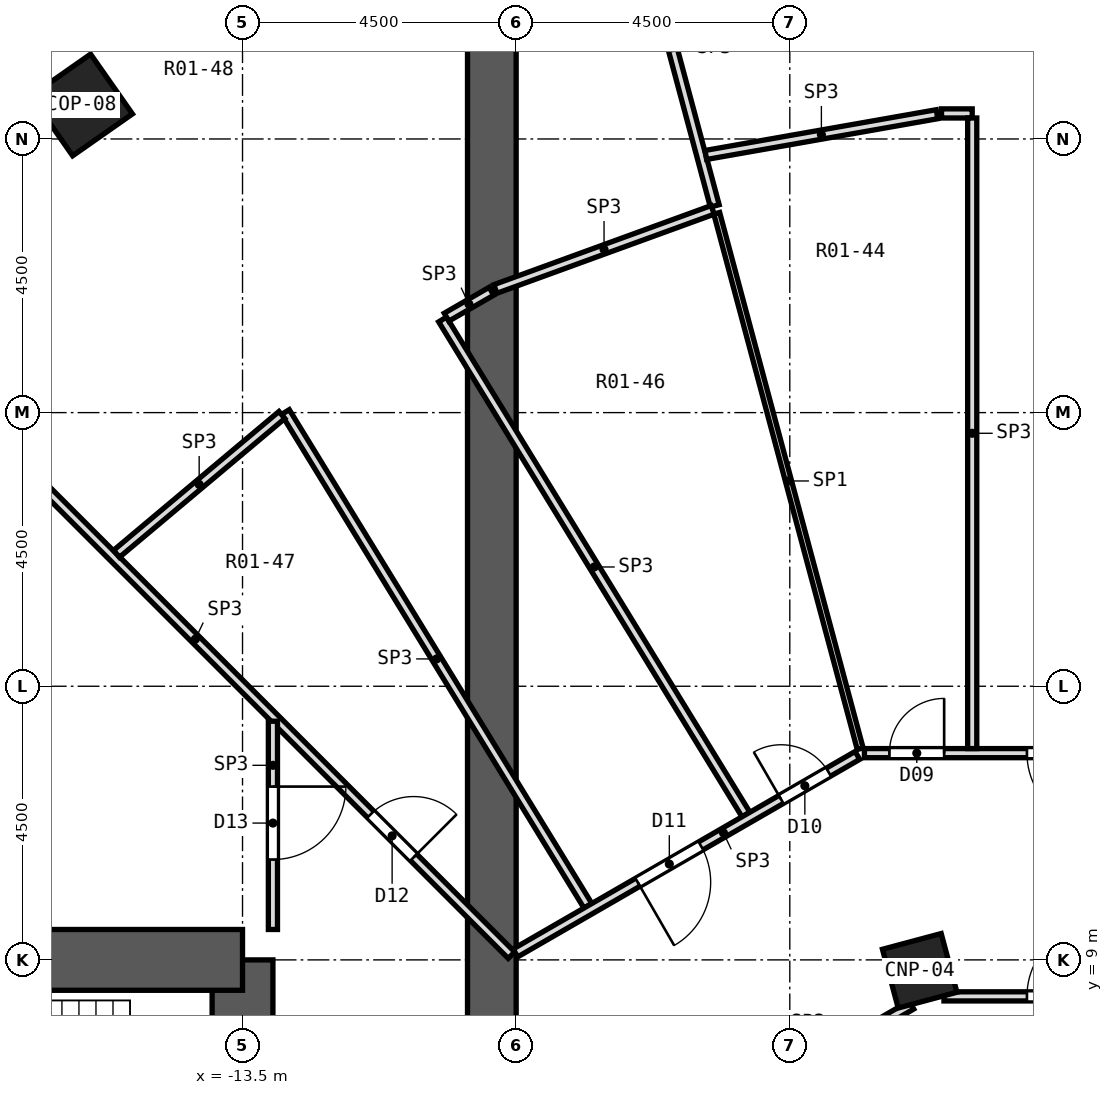
"""IFC4 building model, lengths in metres.
Left out: names, types, materials, properties, quantities, classifications, styles, units other than length and angle.
Written with IfcOpenShell. Run it as: python <this file> out.ifc"""

import sys

from ifc_helpers import new_model, si_unit, direction, frame, frame_2d, origin, origin_2d, place, context, subcontext, project, spatial, rectangle, extrude, element, fill, save


model = new_model("IFC4")
c1 = context("Model", 3, precision=1e-05, world=origin(), true_north=direction((0.0, 1.0)))
c2 = subcontext(c1, "Body", "Model", "MODEL_VIEW")
j1 = project(units=[si_unit("LENGTHUNIT", "METRE"), si_unit("PLANEANGLEUNIT", "RADIAN")], contexts=[c1])
p1 = place(None, origin())
s1 = spatial("IfcSite", under=j1, at=p1, CompositionType="ELEMENT")
p2 = place(p1, origin())
s2 = spatial("IfcBuilding", under=s1, at=p2, CompositionType="ELEMENT")
p3 = place(p2, frame((0.0, 0.0, -9.0)))
s3 = spatial("IfcBuildingStorey", under=s2, at=p3, CompositionType="ELEMENT", Elevation=-9.0)
p4 = place(p3, frame((-16.146, 23.059, -0.3), z_axis=(0.0, 0.0, 1.0), x_axis=(-0.573576436351, 0.819152044289, 0.0)))
e1 = element("IfcColumn", 1, at=p4, inside=s3, PredefinedType="COLUMN", context=c2, shape_type="SweptSolid", body=[
    extrude(rectangle(XDim=1.2, YDim=1.2, at=origin_2d()), origin(), (0.0, 0.0, 1.0), 4.8),
])
p5 = place(p3, frame((-2.364, 8.821, -0.3), z_axis=(0.0, 0.0, 1.0), x_axis=(-0.258819045103, 0.965925826289, 0.0)))
e2 = element("IfcColumn", 2, at=p5, inside=s3, PredefinedType="COLUMN", context=c2, shape_type="SweptSolid", body=[
    extrude(rectangle(XDim=1.0, YDim=1.0, at=origin_2d()), origin(), (0.0, 0.0, 1.0), 4.8),
])
p6 = place(p3, frame((-13.5, -9.0, -0.3), z_axis=(0.0, 0.0, 1.0), x_axis=(0.0, 1.0, 0.0)))
e3 = element("IfcWall", 3, at=p6, inside=s3, PredefinedType="SHEAR", context=c2, shape_type="SweptSolid", body=[
    extrude(rectangle(XDim=18.0, YDim=1.0, at=frame_2d((9.0, 0.0))), origin(), (0.0, 0.0, 1.0), 4.8),
])
p7 = place(p6, frame((15.4, 0.0, 0.3)))
e4 = element("IfcOpeningElement", 4, at=p7, cuts=e3, PredefinedType="OPENING", context=c2, shape_type="SweptSolid", body=[
    extrude(rectangle(XDim=1.2, YDim=2.1, at=frame_2d((0.6, 1.05))), frame((0.0, 0.512, 0.0), z_axis=(0.0, -1.0, 0.0), x_axis=(1.0, 0.0, 0.0)), (0.0, 0.0, 1.0), 1.024),
])
p8 = place(p6, frame((1.4, 0.0, 0.3)))
e5 = element("IfcOpeningElement", 5, at=p8, cuts=e3, PredefinedType="OPENING", context=c2, shape_type="SweptSolid", body=[
    extrude(rectangle(XDim=1.2, YDim=2.1, at=frame_2d((0.6, 1.05))), frame((0.0, 0.512, 0.0), z_axis=(0.0, -1.0, 0.0), x_axis=(1.0, 0.0, 0.0)), (0.0, 0.0, 1.0), 1.024),
])
p9 = place(p6, frame((7.5, 0.0, 0.3)))
e6 = element("IfcOpeningElement", 6, at=p9, cuts=e3, PredefinedType="OPENING", context=c2, shape_type="SweptSolid", body=[
    extrude(rectangle(XDim=3.0, YDim=2.4, at=frame_2d((1.5, 1.2))), frame((0.0, 0.512, 0.0), z_axis=(0.0, -1.0, 0.0), x_axis=(1.0, 0.0, 0.0)), (0.0, 0.0, 1.0), 1.024),
])
p10 = place(p3, frame((-13.5, 9.0, -0.3), z_axis=(0.0, 0.0, 1.0), x_axis=(-1.0, 0.0, 0.0)))
e7 = element("IfcWall", 7, at=p10, inside=s3, PredefinedType="SHEAR", context=c2, shape_type="SweptSolid", body=[
    extrude(rectangle(XDim=12.4, YDim=1.0, at=frame_2d((6.2, 0.0))), origin(), (0.0, 0.0, 1.0), 4.8),
])
p11 = place(p3, frame((-9.4, -27.077, -0.3), z_axis=(0.0, 0.0, 1.0), x_axis=(0.0, 1.0, 0.0)))
e8 = element("IfcWall", 8, at=p11, inside=s3, PredefinedType="SHEAR", context=c2, shape_type="SweptSolid", body=[
    extrude(rectangle(XDim=54.154, YDim=0.8, at=frame_2d((27.077, 0.0))), origin(), (0.0, 0.0, 1.0), 4.8),
])
p12 = place(p3, frame((-5.702, 21.279, 0.0), z_axis=(0.0, 0.0, 1.0), x_axis=(0.258795874203, -0.965932034615, 0.0)))
e9 = element("IfcWall", 9, at=p12, inside=s3, PredefinedType="PARTITIONING", context=c2, shape_type="SweptSolid", body=[
    extrude(rectangle(XDim=9.117, YDim=0.1, at=frame_2d((4.558, 0.0))), origin(), (0.0, 0.0, 1.0), 3.95),
])
p13 = place(p3, frame((-7.128, 26.602, 0.0), z_axis=(0.0, 0.0, 1.0), x_axis=(0.258799530373, -0.965931055034, 0.0)))
e10 = element("IfcWall", 10, at=p13, inside=s3, PredefinedType="PARTITIONING", context=c2, shape_type="SweptSolid", body=[
    extrude(rectangle(XDim=5.386, YDim=0.15, at=frame_2d((2.693, 0.0))), origin(), (0.0, 0.0, 1.0), 3.95),
])
p14 = place(p3, frame((-12.795, 18.009, 0.0), z_axis=(0.0, 0.0, 1.0), x_axis=(0.522436995147, -0.852677891177, 0.0)))
e11 = element("IfcWall", 11, at=p14, inside=s3, PredefinedType="PARTITIONING", context=c2, shape_type="SweptSolid", body=[
    extrude(rectangle(XDim=9.522, YDim=0.15, at=frame_2d((4.761, 0.0))), origin(), (0.0, 0.0, 1.0), 3.95),
])
p15 = place(p3, frame((-10.21, 19.532, 0.0), z_axis=(0.0, 0.0, 1.0), x_axis=(0.522490105179, -0.852645348307, 0.0)))
e12 = element("IfcWall", 12, at=p15, inside=s3, PredefinedType="PARTITIONING", context=c2, shape_type="SweptSolid", body=[
    extrude(rectangle(XDim=9.548, YDim=0.15, at=frame_2d((4.774, 0.0))), origin(), (0.0, 0.0, 1.0), 3.95),
])
p16 = place(p3, frame((-19.474, 19.474, 0.0), z_axis=(0.0, 0.0, 1.0), x_axis=(0.707106781187, -0.707106781187, 0.0)))
e13 = element("IfcWall", 13, at=p16, inside=s3, PredefinedType="PARTITIONING", context=c2, shape_type="SweptSolid", body=[
    extrude(rectangle(XDim=14.703, YDim=0.15, at=frame_2d((7.352, 0.0))), origin(), (0.0, 0.0, 1.0), 3.95),
])
p17 = place(p16, frame((11.427, 0.0, 0.0)))
e14 = element("IfcOpeningElement", 14, at=p17, cuts=e13, PredefinedType="OPENING", context=c2, shape_type="SweptSolid", body=[
    extrude(rectangle(XDim=1.0, YDim=2.1, at=frame_2d((0.5, 1.05))), frame((0.0, 0.087, 0.0), z_axis=(0.0, -1.0, 0.0), x_axis=(1.0, 0.0, 0.0)), (0.0, 0.0, 1.0), 0.174),
])
p18 = place(p3, frame((-1.964, 8.4, 0.0), z_axis=(0.0, 0.0, 1.0), x_axis=(1.0, 0.0, 0.0)))
e15 = element("IfcWall", 15, at=p18, inside=s3, PredefinedType="PARTITIONING", context=c2, shape_type="SweptSolid", body=[
    extrude(rectangle(XDim=3.929, YDim=0.15, at=frame_2d((1.964, 0.0))), origin(), (0.0, 0.0, 1.0), 3.95),
])
p19 = place(p18, frame((1.365, 0.0, 0.0)))
e16 = element("IfcOpeningElement", 16, at=p19, cuts=e15, PredefinedType="OPENING", context=c2, shape_type="SweptSolid", body=[
    extrude(rectangle(XDim=1.2, YDim=2.1, at=frame_2d((0.6, 1.05))), frame((0.0, 0.087, 0.0), z_axis=(0.0, -1.0, 0.0), x_axis=(1.0, 0.0, 0.0)), (0.0, 0.0, 1.0), 0.174),
])
p20 = place(p3, frame((-3.273, 12.4, 0.0), z_axis=(0.0, 0.0, 1.0), x_axis=(1.0, 0.0, 0.0)))
e17 = element("IfcWall", 17, at=p20, inside=s3, PredefinedType="PARTITIONING", context=c2, shape_type="SweptSolid", body=[
    extrude(rectangle(XDim=6.521, YDim=0.15, at=frame_2d((3.26, 0.0))), origin(), (0.0, 0.0, 1.0), 3.95),
])
p21 = place(p20, frame((5.185, 0.0, 0.0)))
e18 = element("IfcOpeningElement", 18, at=p21, cuts=e17, PredefinedType="OPENING", context=c2, shape_type="SweptSolid", body=[
    extrude(rectangle(XDim=1.0, YDim=2.1, at=frame_2d((0.5, 1.05))), frame((0.0, 0.087, 0.0), z_axis=(0.0, -1.0, 0.0), x_axis=(1.0, 0.0, 0.0)), (0.0, 0.0, 1.0), 0.174),
])
p22 = place(p20, frame((2.673, 0.0, 0.0)))
e19 = element("IfcOpeningElement", 19, at=p22, cuts=e17, PredefinedType="OPENING", context=c2, shape_type="SweptSolid", body=[
    extrude(rectangle(XDim=1.2, YDim=2.1, at=frame_2d((0.6, 1.05))), frame((0.0, 0.087, 0.0), z_axis=(0.0, -1.0, 0.0), x_axis=(1.0, 0.0, 0.0)), (0.0, 0.0, 1.0), 0.174),
])
p23 = place(p20, frame((0.412, 0.0, 0.0)))
e20 = element("IfcOpeningElement", 20, at=p23, cuts=e17, PredefinedType="OPENING", context=c2, shape_type="SweptSolid", body=[
    extrude(rectangle(XDim=0.9, YDim=2.1, at=frame_2d((0.45, 1.05))), frame((0.0, 0.087, 0.0), z_axis=(0.0, -1.0, 0.0), x_axis=(1.0, 0.0, 0.0)), (0.0, 0.0, 1.0), 0.174),
])
p24 = place(p3, frame((-2.005, 22.92, 0.0), z_axis=(0.0, 0.0, 1.0), x_axis=(1.0, 0.0, 0.0)))
e21 = element("IfcWall", 21, at=p24, inside=s3, PredefinedType="PARTITIONING", context=c2, shape_type="SweptSolid", body=[
    extrude(rectangle(XDim=0.505, YDim=0.15, at=frame_2d((0.252, 0.0))), origin(), (0.0, 0.0, 1.0), 3.95),
])
p25 = place(p3, frame((-5.881, 22.237, 0.0), z_axis=(0.0, 0.0, 1.0), x_axis=(0.984830631008, 0.173518380088, 0.0)))
e22 = element("IfcWall", 22, at=p25, inside=s3, PredefinedType="PARTITIONING", context=c2, shape_type="SweptSolid", body=[
    extrude(rectangle(XDim=3.861, YDim=0.15, at=frame_2d((1.93, 0.0))), origin(), (0.0, 0.0, 1.0), 3.95),
])
p26 = place(p3, frame((-9.342, 20.033, 0.0), z_axis=(0.0, 0.0, 1.0), x_axis=(0.939675295546, 0.34206774028, 0.0)))
e23 = element("IfcWall", 23, at=p26, inside=s3, PredefinedType="PARTITIONING", context=c2, shape_type="SweptSolid", body=[
    extrude(rectangle(XDim=3.803, YDim=0.15, at=frame_2d((1.902, 0.0))), origin(), (0.0, 0.0, 1.0), 3.95),
])
p27 = place(p3, frame((-5.902, 6.292, 0.0), z_axis=(0.0, 0.0, 1.0), x_axis=(0.865990036525, 0.500061252887, 0.0)))
e24 = element("IfcWall", 24, at=p27, inside=s3, PredefinedType="PARTITIONING", context=c2, shape_type="SweptSolid", body=[
    extrude(rectangle(XDim=3.93, YDim=0.15, at=frame_2d((1.965, 0.0))), origin(), (0.0, 0.0, 1.0), 3.95),
])
p28 = place(p3, frame((-9.012, 9.115, 0.0), z_axis=(0.0, 0.0, 1.0), x_axis=(0.865967095912, 0.5001009786, 0.0)))
e25 = element("IfcWall", 25, at=p28, inside=s3, PredefinedType="PARTITIONING", context=c2, shape_type="SweptSolid", body=[
    extrude(rectangle(XDim=6.495, YDim=0.15, at=frame_2d((3.248, 0.0))), origin(), (0.0, 0.0, 1.0), 3.95),
])
p29 = place(p28, frame((5.046, 0.0, 0.0)))
e26 = element("IfcOpeningElement", 26, at=p29, cuts=e25, PredefinedType="OPENING", context=c2, shape_type="SweptSolid", body=[
    extrude(rectangle(XDim=0.9, YDim=2.1, at=frame_2d((0.45, 1.05))), frame((0.0, 0.087, 0.0), z_axis=(0.0, -1.0, 0.0), x_axis=(1.0, 0.0, 0.0)), (0.0, 0.0, 1.0), 0.174),
])
p30 = place(p28, frame((2.323, 0.0, 0.0)))
e27 = element("IfcOpeningElement", 27, at=p30, cuts=e25, PredefinedType="OPENING", context=c2, shape_type="SweptSolid", body=[
    extrude(rectangle(XDim=1.2, YDim=2.1, at=frame_2d((0.6, 1.05))), frame((0.0, 0.087, 0.0), z_axis=(0.0, -1.0, 0.0), x_axis=(1.0, 0.0, 0.0)), (0.0, 0.0, 1.0), 0.174),
])
p31 = place(p3, frame((-10.145, 19.57, 0.0), z_axis=(0.0, 0.0, 1.0), x_axis=(0.866066322073, 0.499929120747, 0.0)))
e28 = element("IfcWall", 28, at=p31, inside=s3, PredefinedType="PARTITIONING", context=c2, shape_type="SweptSolid", body=[
    extrude(rectangle(XDim=0.852, YDim=0.15, at=frame_2d((0.426, 0.0))), origin(), (0.0, 0.0, 1.0), 3.95),
])
p32 = place(p3, frame((-15.573, 15.678, 0.0), z_axis=(0.0, 0.0, 1.0), x_axis=(0.766024433349, 0.642811455648, 0.0)))
e29 = element("IfcWall", 29, at=p32, inside=s3, PredefinedType="PARTITIONING", context=c2, shape_type="SweptSolid", body=[
    extrude(rectangle(XDim=3.551, YDim=0.15, at=frame_2d((1.775, 0.0))), origin(), (0.0, 0.0, 1.0), 3.95),
])
p33 = place(p3, frame((-1.5, 12.475, 0.0), z_axis=(0.0, 0.0, 1.0), x_axis=(0.0, 1.0, 0.0)))
e30 = element("IfcWall", 30, at=p33, inside=s3, PredefinedType="PARTITIONING", context=c2, shape_type="SweptSolid", body=[
    extrude(rectangle(XDim=10.37, YDim=0.15, at=frame_2d((5.185, 0.0))), origin(), (0.0, 0.0, 1.0), 3.95),
])
p34 = place(p3, frame((-13.0, 9.5, 0.0), z_axis=(0.0, 0.0, 1.0), x_axis=(0.0, 1.0, 0.0)))
e31 = element("IfcWall", 31, at=p34, inside=s3, PredefinedType="PARTITIONING", context=c2, shape_type="SweptSolid", body=[
    extrude(rectangle(XDim=3.425, YDim=0.15, at=frame_2d((1.712, 0.0))), origin(), (0.0, 0.0, 1.0), 3.95),
])
p35 = place(p34, frame((1.15, 0.0, 0.0)))
e32 = element("IfcOpeningElement", 32, at=p35, cuts=e31, PredefinedType="OPENING", context=c2, shape_type="SweptSolid", body=[
    extrude(rectangle(XDim=1.2, YDim=2.1, at=frame_2d((0.6, 1.05))), frame((0.0, 0.087, 0.0), z_axis=(0.0, -1.0, 0.0), x_axis=(1.0, 0.0, 0.0)), (0.0, 0.0, 1.0), 0.174),
])
p36 = place(p19, origin())
e33 = element("IfcDoor", 33, at=p36, inside=s3, OperationType="SINGLE_SWING_RIGHT", PredefinedType="DOOR", context=c2, shape_type="SweptSolid", body=[
    extrude(rectangle(XDim=1.2, YDim=2.1, at=frame_2d((0.6, 1.05))), frame((0.0, 0.025, 0.0), z_axis=(0.0, -1.0, 0.0), x_axis=(1.0, 0.0, 0.0)), (0.0, 0.0, 1.0), 0.05),
])
fill(e16, e33)
p37 = place(p22, frame((1.2, 0.0, 0.0), z_axis=(0.0, 0.0, 1.0), x_axis=(-1.0, 0.0, 0.0)))
e34 = element("IfcDoor", 34, at=p37, inside=s3, OperationType="SINGLE_SWING_LEFT", PredefinedType="DOOR", context=c2, shape_type="SweptSolid", body=[
    extrude(rectangle(XDim=1.2, YDim=2.1, at=frame_2d((0.6, 1.05))), frame((0.0, 0.025, 0.0), z_axis=(0.0, -1.0, 0.0), x_axis=(1.0, 0.0, 0.0)), (0.0, 0.0, 1.0), 0.05),
])
fill(e19, e34)
p38 = place(p23, origin())
e35 = element("IfcDoor", 35, at=p38, inside=s3, OperationType="SINGLE_SWING_RIGHT", PredefinedType="DOOR", context=c2, shape_type="SweptSolid", body=[
    extrude(rectangle(XDim=0.9, YDim=2.1, at=frame_2d((0.45, 1.05))), frame((0.0, 0.025, 0.0), z_axis=(0.0, -1.0, 0.0), x_axis=(1.0, 0.0, 0.0)), (0.0, 0.0, 1.0), 0.05),
])
fill(e20, e35)
p39 = place(p29, origin())
e36 = element("IfcDoor", 36, at=p39, inside=s3, OperationType="SINGLE_SWING_LEFT", PredefinedType="DOOR", context=c2, shape_type="SweptSolid", body=[
    extrude(rectangle(XDim=0.9, YDim=2.1, at=frame_2d((0.45, 1.05))), frame((0.0, 0.025, 0.0), z_axis=(0.0, -1.0, 0.0), x_axis=(1.0, 0.0, 0.0)), (0.0, 0.0, 1.0), 0.05),
])
fill(e26, e36)
p40 = place(p30, frame((1.2, 0.0, 0.0), z_axis=(0.0, 0.0, 1.0), x_axis=(-1.0, 0.0, 0.0)))
e37 = element("IfcDoor", 37, at=p40, inside=s3, OperationType="SINGLE_SWING_RIGHT", PredefinedType="DOOR", context=c2, shape_type="SweptSolid", body=[
    extrude(rectangle(XDim=1.2, YDim=2.1, at=frame_2d((0.6, 1.05))), frame((0.0, 0.025, 0.0), z_axis=(0.0, -1.0, 0.0), x_axis=(1.0, 0.0, 0.0)), (0.0, 0.0, 1.0), 0.05),
])
fill(e27, e37)
p41 = place(p17, origin())
e38 = element("IfcDoor", 38, at=p41, inside=s3, OperationType="SINGLE_SWING_RIGHT", PredefinedType="DOOR", context=c2, shape_type="SweptSolid", body=[
    extrude(rectangle(XDim=1.0, YDim=2.1, at=frame_2d((0.5, 1.05))), frame((0.0, 0.025, 0.0), z_axis=(0.0, -1.0, 0.0), x_axis=(1.0, 0.0, 0.0)), (0.0, 0.0, 1.0), 0.05),
])
fill(e14, e38)
p42 = place(p35, frame((1.2, 0.0, 0.0), z_axis=(0.0, 0.0, 1.0), x_axis=(-1.0, 0.0, 0.0)))
e39 = element("IfcDoor", 39, at=p42, inside=s3, OperationType="SINGLE_SWING_LEFT", PredefinedType="DOOR", context=c2, shape_type="SweptSolid", body=[
    extrude(rectangle(XDim=1.2, YDim=2.1, at=frame_2d((0.6, 1.05))), frame((0.0, 0.025, 0.0), z_axis=(0.0, -1.0, 0.0), x_axis=(1.0, 0.0, 0.0)), (0.0, 0.0, 1.0), 0.05),
])
fill(e32, e39)
save(model, sys.argv[1])
